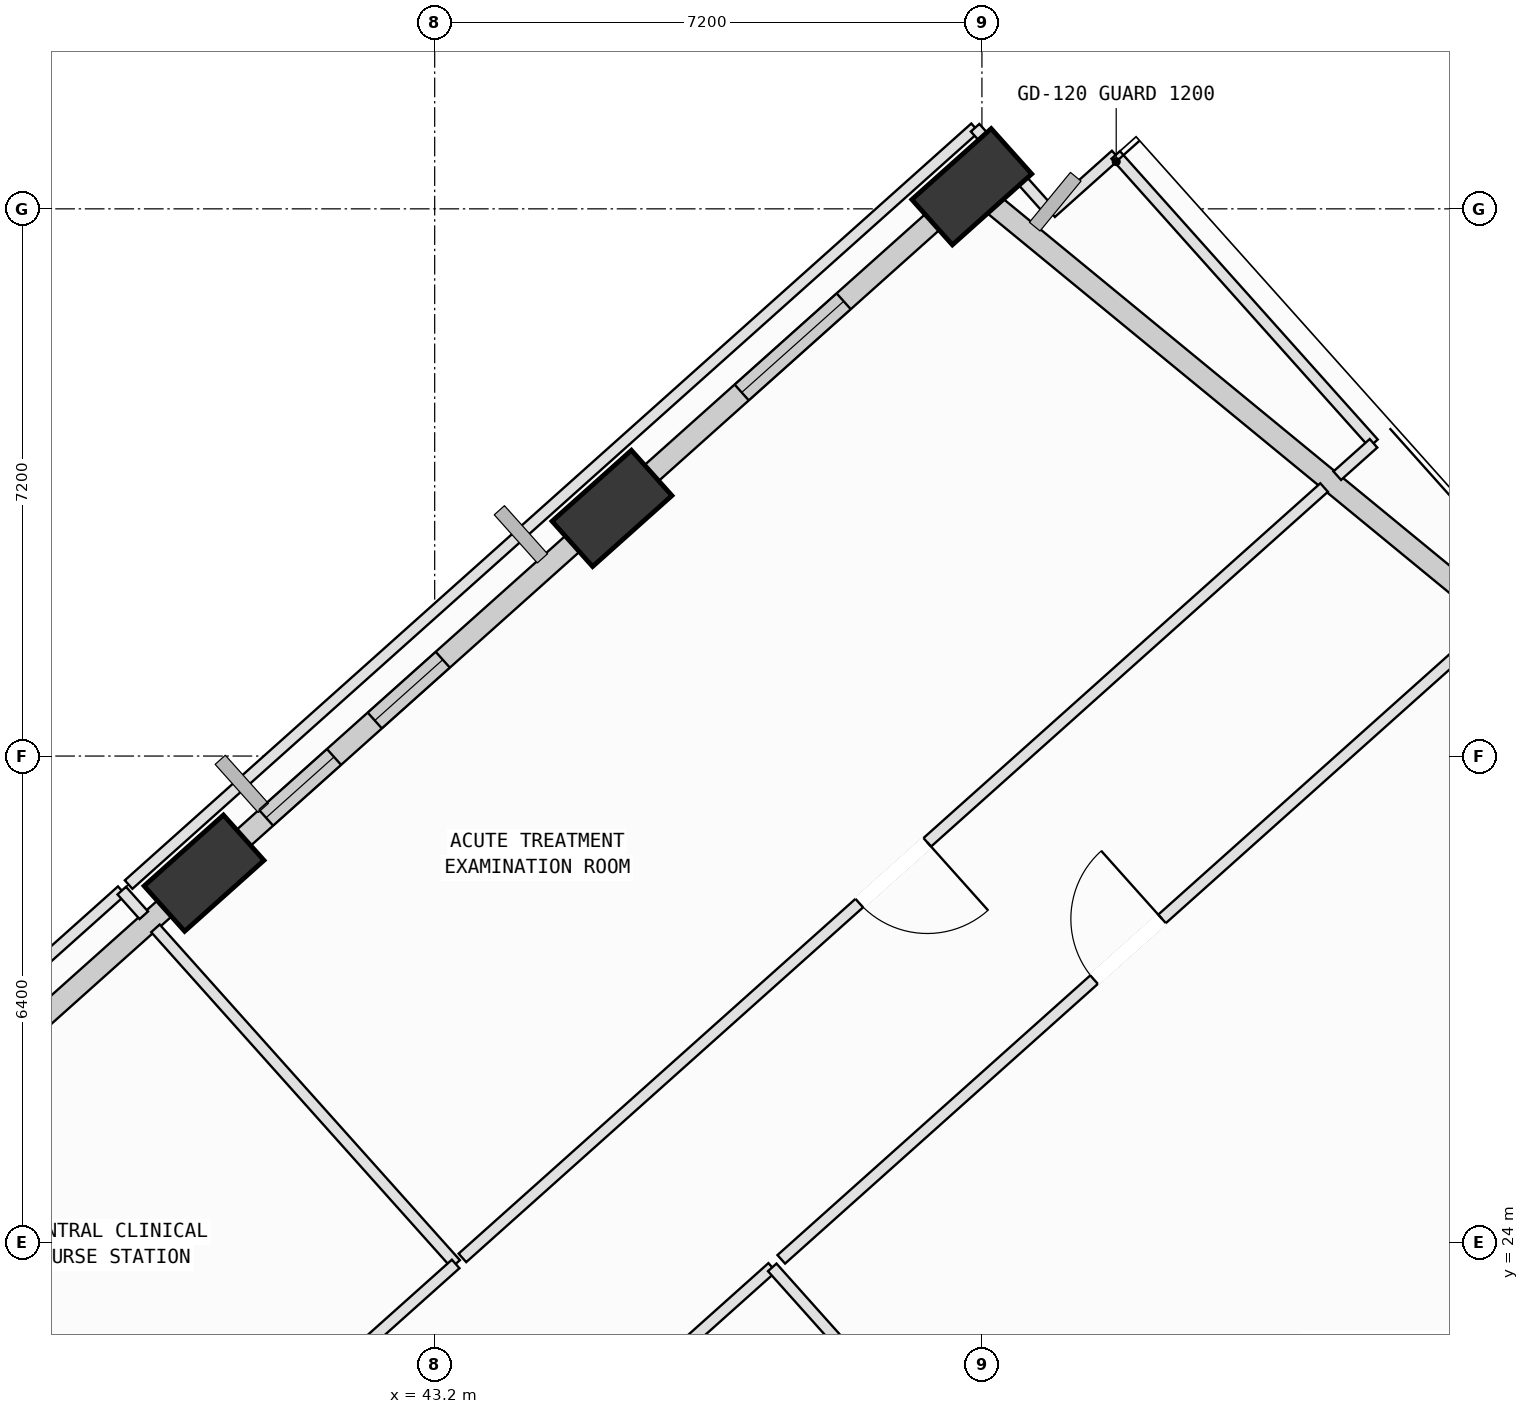
"""IFC4 building model, lengths in metres.
Left out: names, types, materials, properties, quantities, classifications, styles, units other than length and angle.
Written with IfcOpenShell. Run it as: python <this file> out.ifc"""

import sys

from ifc_helpers import new_model, si_unit, direction, frame, frame_2d, origin, origin_2d, place, context, subcontext, project, spatial, rectangle, extrude, element, fill, save


model = new_model("IFC4")
c1 = context("Model", 3, precision=1e-05, world=origin(), true_north=direction((0.0, 1.0)))
c2 = subcontext(c1, "Body", "Model", "MODEL_VIEW")
j1 = project(units=[si_unit("LENGTHUNIT", "METRE"), si_unit("PLANEANGLEUNIT", "RADIAN")], contexts=[c1])
p1 = place(None, origin())
s1 = spatial("IfcSite", under=j1, at=p1, CompositionType="ELEMENT")
p2 = place(p1, origin())
s2 = spatial("IfcBuilding", under=s1, at=p2, CompositionType="ELEMENT")
p3 = place(p2, frame((0.0, 0.0, 201.8)))
s3 = spatial("IfcBuildingStorey", under=s2, at=p3, CompositionType="ELEMENT", Elevation=201.8)
p4 = place(p3, frame((50.267, 37.891, 0.002), z_axis=(-0.054661231056, 0.068403918818, 0.996159150794), x_axis=(-0.167881968928, -0.984077987012, 0.058362316498)))
e1 = element("IfcColumn", 1, at=p4, inside=s3, PredefinedType="COLUMN", context=c2, shape_type="SweptSolid", body=[
    extrude(rectangle(XDim=1.4, YDim=0.8, at=origin_2d()), origin(), (0.0, 0.0, 1.0), 3.944),
])
p5 = place(p3, frame((45.533, 33.658, 0.002), z_axis=(-0.037026435921, 0.049060027595, 0.998109290977), x_axis=(-0.19426625629, -0.980092983401, 0.040967860024)))
e2 = element("IfcColumn", 2, at=p5, inside=s3, PredefinedType="COLUMN", context=c2, shape_type="SweptSolid", body=[
    extrude(rectangle(XDim=1.4, YDim=0.8, at=origin_2d()), origin(), (0.0, 0.0, 1.0), 3.956),
])
p6 = place(p3, frame((40.165, 28.859, 0.002), z_axis=(-0.017020693495, 0.027036480641, 0.999489532065), x_axis=(-0.275948140466, -0.960936612332, 0.021294385498)))
e3 = element("IfcColumn", 3, at=p6, inside=s3, PredefinedType="COLUMN", context=c2, shape_type="SweptSolid", body=[
    extrude(rectangle(XDim=1.4, YDim=0.8, at=origin_2d()), origin(), (0.0, 0.0, 1.0), 3.973),
])
p7 = place(p3, frame((50.516, 37.686, 0.0), z_axis=(0.0, 0.0, 1.0), x_axis=(0.772625109764, -0.634862536115, 0.0)))
e4 = element("IfcWall", 4, at=p7, inside=s3, PredefinedType="SOLIDWALL", context=c2, shape_type="SweptSolid", body=[
    extrude(rectangle(XDim=8.838, YDim=0.28, at=frame_2d((4.419, 0.0))), origin(), (0.0, 0.0, 1.0), 3.185),
])
p8 = place(p3, frame((45.899, 33.986, 0.0), z_axis=(0.0, 0.0, 1.0), x_axis=(0.745484640353, 0.66652280606, 0.0)))
e5 = element("IfcWall", 5, at=p8, inside=s3, PredefinedType="SOLIDWALL", context=c2, shape_type="SweptSolid", body=[
    extrude(rectangle(XDim=5.405, YDim=0.28, at=frame_2d((2.702, 0.0))), origin(), (0.0, 0.0, 1.0), 3.185),
])
p9 = place(p8, frame((1.798, 0.0, 0.75)))
e6 = element("IfcOpeningElement", 6, at=p9, cuts=e5, PredefinedType="OPENING", context=c2, shape_type="SweptSolid", body=[
    extrude(rectangle(XDim=1.8, YDim=2.05, at=frame_2d((0.9, 1.025))), frame((0.0, 0.15, 0.0), z_axis=(0.0, -1.0, 0.0), x_axis=(1.0, 0.0, 0.0)), (0.0, 0.0, 1.0), 0.3),
])
p10 = place(p3, frame((40.54, 29.194, 0.0), z_axis=(0.0, 0.0, 1.0), x_axis=(0.745469957375, 0.666539228141, 0.0)))
e7 = element("IfcWall", 7, at=p10, inside=s3, PredefinedType="SOLIDWALL", context=c2, shape_type="SweptSolid", body=[
    extrude(rectangle(XDim=6.226, YDim=0.28, at=frame_2d((3.113, 0.0))), origin(), (0.0, 0.0, 1.0), 2.985),
])
p11 = place(p10, frame((2.51, 0.0, 0.75)))
e8 = element("IfcOpeningElement", 8, at=p11, cuts=e7, PredefinedType="OPENING", context=c2, shape_type="SweptSolid", body=[
    extrude(rectangle(XDim=1.2, YDim=1.75, at=frame_2d((0.6, 0.875))), frame((0.0, 0.15, 0.0), z_axis=(0.0, -1.0, 0.0), x_axis=(1.0, 0.0, 0.0)), (0.0, 0.0, 1.0), 0.3),
])
p12 = place(p10, frame((0.591, 0.0, 0.75)))
e9 = element("IfcOpeningElement", 9, at=p12, cuts=e7, PredefinedType="OPENING", context=c2, shape_type="SweptSolid", body=[
    extrude(rectangle(XDim=1.2, YDim=1.75, at=frame_2d((0.6, 0.875))), frame((0.0, 0.15, 0.0), z_axis=(0.0, -1.0, 0.0), x_axis=(1.0, 0.0, 0.0)), (0.0, 0.0, 1.0), 0.3),
])
p13 = place(p3, frame((35.176, 24.398, 0.0), z_axis=(0.0, 0.0, 1.0), x_axis=(0.745469496109, 0.66653974403, 0.0)))
e10 = element("IfcWall", 10, at=p13, inside=s3, PredefinedType="SOLIDWALL", context=c2, shape_type="SweptSolid", body=[
    extrude(rectangle(XDim=6.211, YDim=0.28, at=frame_2d((3.105, 0.0))), origin(), (0.0, 0.0, 1.0), 3.185),
])
p14 = place(p13, frame((1.961, 0.0, 0.75)))
e11 = element("IfcOpeningElement", 11, at=p14, cuts=e10, PredefinedType="OPENING", context=c2, shape_type="SweptSolid", body=[
    extrude(rectangle(XDim=1.6, YDim=1.95, at=frame_2d((0.8, 0.975))), frame((0.0, 0.15, 0.0), z_axis=(0.0, -1.0, 0.0), x_axis=(1.0, 0.0, 0.0)), (0.0, 0.0, 1.0), 0.3),
])
p15 = place(p3, frame((38.516, 15.513, 0.0), z_axis=(0.0, 0.0, 1.0), x_axis=(0.745456187518, 0.666554628287, 0.0)))
e12 = element("IfcWall", 12, at=p15, inside=s3, PredefinedType="PARTITIONING", context=c2, shape_type="SweptSolid", body=[
    extrude(rectangle(XDim=12.241, YDim=0.15, at=frame_2d((6.12, 0.0))), origin(), (0.0, 0.0, 1.0), 3.7),
])
p16 = place(p15, frame((5.521, 0.0, 0.0)))
e13 = element("IfcOpeningElement", 13, at=p16, cuts=e12, PredefinedType="OPENING", context=c2, shape_type="SweptSolid", body=[
    extrude(rectangle(XDim=1.2, YDim=2.15, at=frame_2d((0.6, 1.075))), frame((0.0, 0.085, 0.0), z_axis=(0.0, -1.0, 0.0), x_axis=(1.0, 0.0, 0.0)), (0.0, 0.0, 1.0), 0.17),
])
p17 = place(p3, frame((47.641, 23.672, 0.0), z_axis=(0.0, 0.0, 1.0), x_axis=(0.666482690368, -0.745520505043, 0.0)))
e14 = element("IfcWall", 14, at=p17, inside=s3, PredefinedType="PARTITIONING", context=c2, shape_type="SweptSolid", body=[
    extrude(rectangle(XDim=11.936, YDim=0.15, at=frame_2d((5.968, 0.0))), origin(), (0.0, 0.0, 1.0), 3.7),
])
p18 = place(p3, frame((47.76, 23.778, 0.0), z_axis=(0.0, 0.0, 1.0), x_axis=(0.745466097876, 0.666543544652, 0.0)))
e15 = element("IfcWall", 15, at=p18, inside=s3, PredefinedType="PARTITIONING", context=c2, shape_type="SweptSolid", body=[
    extrude(rectangle(XDim=12.241, YDim=0.15, at=frame_2d((6.12, 0.0))), origin(), (0.0, 0.0, 1.0), 2.985),
])
p19 = place(p18, frame((5.521, 0.0, 0.0)))
e16 = element("IfcOpeningElement", 16, at=p19, cuts=e15, PredefinedType="OPENING", context=c2, shape_type="SweptSolid", body=[
    extrude(rectangle(XDim=1.2, YDim=2.15, at=frame_2d((0.6, 1.075))), frame((0.0, 0.085, 0.0), z_axis=(0.0, -1.0, 0.0), x_axis=(1.0, 0.0, 0.0)), (0.0, 0.0, 1.0), 0.17),
])
p20 = place(p3, frame((30.08, 20.58, 0.0), z_axis=(0.0, 0.0, 1.0), x_axis=(0.745505625265, 0.666499334357, 0.0)))
e17 = element("IfcWall", 17, at=p20, inside=s3, PredefinedType="PARTITIONING", context=c2, shape_type="SweptSolid", body=[
    extrude(rectangle(XDim=12.076, YDim=0.15, at=frame_2d((6.038, 0.0))), origin(), (0.0, 0.0, 1.0), 3.7),
])
p21 = place(p3, frame((39.083, 28.629, 0.0), z_axis=(0.0, 0.0, 1.0), x_axis=(0.667008184931, -0.745050388387, 0.0)))
e18 = element("IfcWall", 18, at=p21, inside=s3, PredefinedType="PARTITIONING", context=c2, shape_type="SweptSolid", body=[
    extrude(rectangle(XDim=0.435, YDim=0.15, at=frame_2d((0.217, 0.0))), origin(), (0.0, 0.0, 1.0), 3.7),
])
p22 = place(p3, frame((39.526, 28.133, 0.0), z_axis=(0.0, 0.0, 1.0), x_axis=(0.666703315067, -0.745323211553, 0.0)))
e19 = element("IfcWall", 19, at=p22, inside=s3, PredefinedType="PARTITIONING", context=c2, shape_type="SweptSolid", body=[
    extrude(rectangle(XDim=5.925, YDim=0.15, at=frame_2d((2.962, 0.0))), origin(), (0.0, 0.0, 1.0), 3.7),
])
p23 = place(p3, frame((43.476, 23.717, 0.0), z_axis=(0.0, 0.0, 1.0), x_axis=(-0.745490689722, -0.66651603997, 0.0)))
e20 = element("IfcWall", 20, at=p23, inside=s3, PredefinedType="PARTITIONING", context=c2, shape_type="SweptSolid", body=[
    extrude(rectangle(XDim=4.557, YDim=0.15, at=frame_2d((2.278, 0.0))), origin(), (0.0, 0.0, 1.0), 3.7),
])
p24 = place(p3, frame((51.31, 37.549, 0.0), z_axis=(0.0, 0.0, 1.0), x_axis=(0.745409304693, 0.666607057026, 0.0)))
e21 = element("IfcWall", 21, at=p24, inside=s3, PredefinedType="PARTITIONING", context=c2, shape_type="SweptSolid", body=[
    extrude(rectangle(XDim=1.14, YDim=0.15, at=frame_2d((0.57, 0.0))), origin(), (0.0, 0.0, 1.0), 3.7),
])
p25 = place(p3, frame((52.16, 38.309, 0.0), z_axis=(0.0, 0.0, 1.0), x_axis=(0.666498941052, -0.745505976889, 0.0)))
e22 = element("IfcWall", 22, at=p25, inside=s3, PredefinedType="PARTITIONING", context=c2, shape_type="SweptSolid", body=[
    extrude(rectangle(XDim=5.089, YDim=0.15, at=frame_2d((2.545, 0.0))), origin(), (0.0, 0.0, 1.0), 3.7),
])
p26 = place(p3, frame((55.552, 34.515, 0.0), z_axis=(0.0, 0.0, 1.0), x_axis=(-0.746059590327, -0.665879183997, 0.0)))
e23 = element("IfcWall", 23, at=p26, inside=s3, PredefinedType="PARTITIONING", context=c2, shape_type="SweptSolid", body=[
    extrude(rectangle(XDim=0.639, YDim=0.15, at=frame_2d((0.32, 0.0))), origin(), (0.0, 0.0, 1.0), 3.7),
])
p27 = place(p3, frame((54.902, 33.933, 0.0), z_axis=(0.0, 0.0, 1.0), x_axis=(-0.745495701488, -0.666510434324, 0.0)))
e24 = element("IfcWall", 24, at=p27, inside=s3, PredefinedType="PARTITIONING", context=c2, shape_type="SweptSolid", body=[
    extrude(rectangle(XDim=15.208, YDim=0.15, at=frame_2d((7.604, 0.0))), origin(), (0.0, 0.0, 1.0), 3.7),
])
p28 = place(p27, frame((7.004, 0.0, 0.0)))
e25 = element("IfcOpeningElement", 25, at=p28, cuts=e24, PredefinedType="OPENING", context=c2, shape_type="SweptSolid", body=[
    extrude(rectangle(XDim=1.2, YDim=2.15, at=frame_2d((0.6, 1.075))), frame((0.0, 0.085, 0.0), z_axis=(0.0, -1.0, 0.0), x_axis=(1.0, 0.0, 0.0)), (0.0, 0.0, 1.0), 0.17),
])
p29 = place(p3, frame((39.173, 28.709, 0.0), z_axis=(0.0, 0.0, 1.0), x_axis=(0.745462238393, 0.666547861095, 0.0)))
e26 = element("IfcWall", 26, at=p29, inside=s3, PredefinedType="PARTITIONING", context=c2, shape_type="SweptSolid", body=[
    extrude(rectangle(XDim=14.94, YDim=0.15, at=frame_2d((7.47, 0.0))), origin(), (0.0, 0.0, 1.0), 2.985),
])
p30 = place(p3, frame((50.31, 38.667, 0.0), z_axis=(0.0, 0.0, 1.0), x_axis=(0.666704454809, -0.745322192034, 0.0)))
e27 = element("IfcWall", 27, at=p30, inside=s3, PredefinedType="PARTITIONING", context=c2, shape_type="SweptSolid", body=[
    extrude(rectangle(XDim=1.5, YDim=0.15, at=frame_2d((0.75, 0.0))), origin(), (0.0, 0.0, 1.0), 3.185),
])
p31 = place(p9, origin())
e28 = element("IfcWindow", 28, at=p31, inside=s3, PartitioningType="SINGLE_PANEL", PredefinedType="WINDOW", context=c2, shape_type="SweptSolid", body=[
    extrude(rectangle(XDim=1.8, YDim=2.05, at=frame_2d((0.9, 1.025))), frame((0.0, 0.03, 0.0), z_axis=(0.0, -1.0, 0.0), x_axis=(1.0, 0.0, 0.0)), (0.0, 0.0, 1.0), 0.06),
])
fill(e6, e28)
p32 = place(p11, origin())
e29 = element("IfcWindow", 29, at=p32, inside=s3, PartitioningType="SINGLE_PANEL", PredefinedType="WINDOW", context=c2, shape_type="SweptSolid", body=[
    extrude(rectangle(XDim=1.2, YDim=1.75, at=frame_2d((0.6, 0.875))), frame((0.0, 0.03, 0.0), z_axis=(0.0, -1.0, 0.0), x_axis=(1.0, 0.0, 0.0)), (0.0, 0.0, 1.0), 0.06),
])
fill(e8, e29)
p33 = place(p12, origin())
e30 = element("IfcWindow", 30, at=p33, inside=s3, PartitioningType="SINGLE_PANEL", PredefinedType="WINDOW", context=c2, shape_type="SweptSolid", body=[
    extrude(rectangle(XDim=1.2, YDim=1.75, at=frame_2d((0.6, 0.875))), frame((0.0, 0.03, 0.0), z_axis=(0.0, -1.0, 0.0), x_axis=(1.0, 0.0, 0.0)), (0.0, 0.0, 1.0), 0.06),
])
fill(e9, e30)
p34 = place(p19, origin())
e31 = element("IfcDoor", 31, at=p34, inside=s3, OperationType="SINGLE_SWING_RIGHT", PredefinedType="DOOR", context=c2, shape_type="SweptSolid", body=[
    extrude(rectangle(XDim=1.2, YDim=2.15, at=frame_2d((0.6, 1.075))), frame((0.0, 0.025, 0.0), z_axis=(0.0, -1.0, 0.0), x_axis=(1.0, 0.0, 0.0)), (0.0, 0.0, 1.0), 0.05),
])
fill(e16, e31)
p35 = place(p28, origin())
e32 = element("IfcDoor", 32, at=p35, inside=s3, OperationType="SINGLE_SWING_LEFT", PredefinedType="DOOR", context=c2, shape_type="SweptSolid", body=[
    extrude(rectangle(XDim=1.2, YDim=2.15, at=frame_2d((0.6, 1.075))), frame((0.0, 0.025, 0.0), z_axis=(0.0, -1.0, 0.0), x_axis=(1.0, 0.0, 0.0)), (0.0, 0.0, 1.0), 0.05),
])
fill(e25, e32)
save(model, sys.argv[1])
